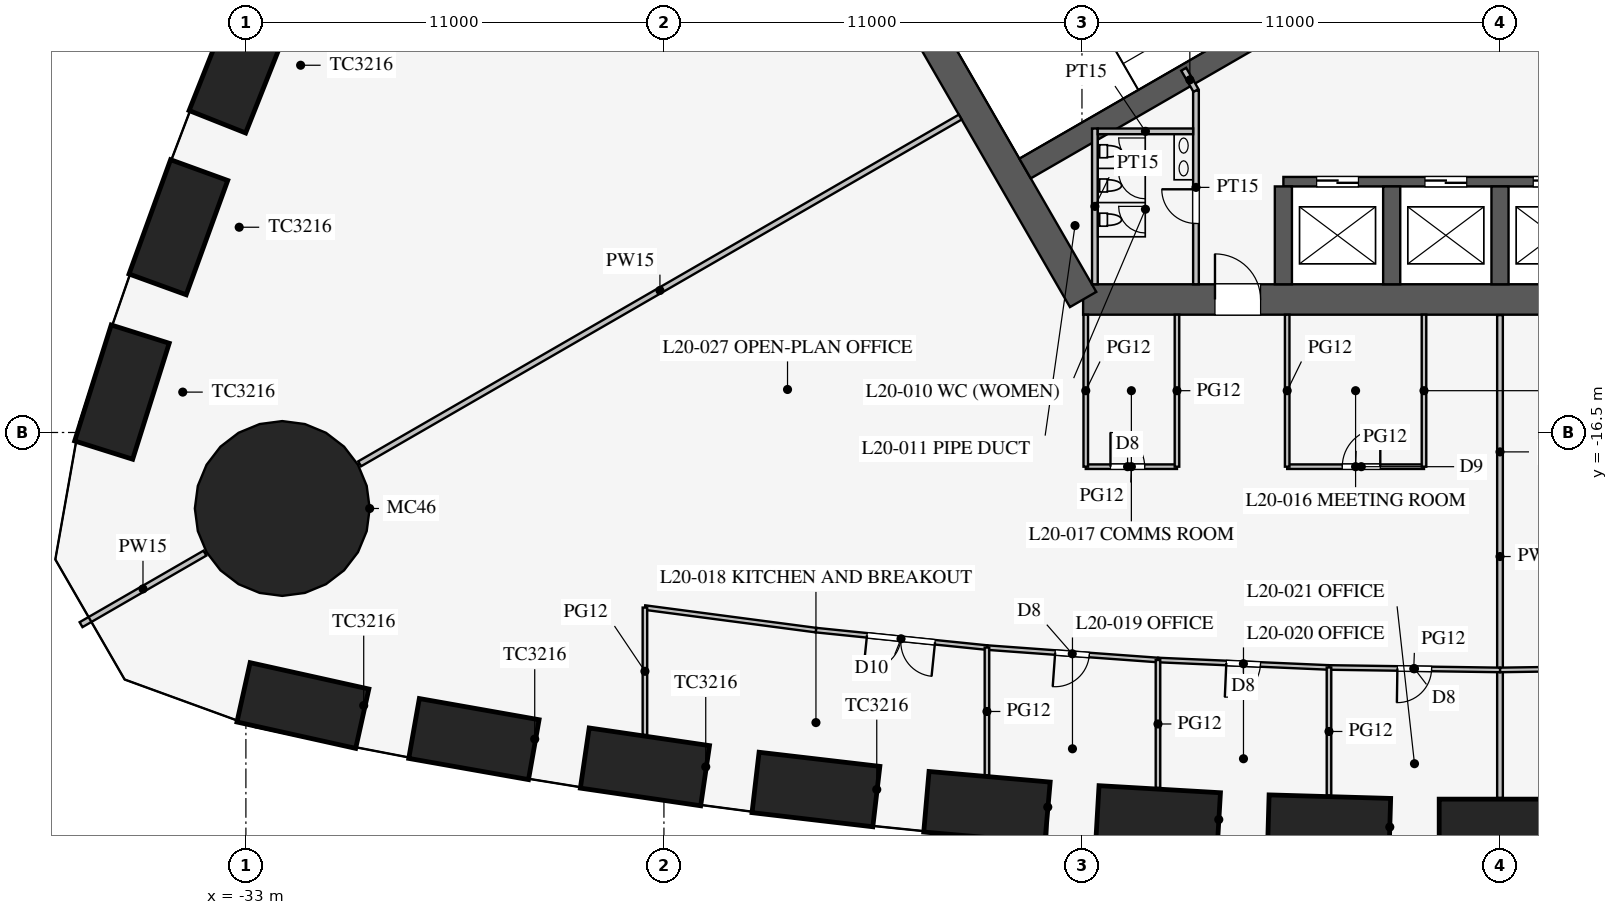
"""IFC4 building model, lengths in metres.
Left out: names, types, materials, properties, quantities, classifications, styles, units other than length and angle.
Written with IfcOpenShell. Run it as: python <this file> out.ifc"""

import sys

from ifc_helpers import new_model, si_unit, direction, frame, frame_2d, origin, origin_2d, place, context, subcontext, project, spatial, rectangle, circle, extrude, element, fill, save


model = new_model("IFC4")
c1 = context("Model", 3, precision=1e-05, world=origin(), true_north=direction((0.0, 1.0)))
c2 = subcontext(c1, "Body", "Model", "MODEL_VIEW")
j1 = project(units=[si_unit("LENGTHUNIT", "METRE"), si_unit("PLANEANGLEUNIT", "RADIAN")], contexts=[c1])
p1 = place(None, origin())
s1 = spatial("IfcSite", under=j1, at=p1, CompositionType="ELEMENT")
p2 = place(p1, origin())
s2 = spatial("IfcBuilding", under=s1, at=p2, CompositionType="ELEMENT")
p3 = place(p2, frame((0.0, 0.0, 87.9)))
s3 = spatial("IfcBuildingStorey", under=s2, at=p3, CompositionType="ELEMENT", Elevation=87.9)
for number, where, z_axis, x_axis in (
    (1, (-31.5, -23.685, 0.0), (0.0, 0.0, 1.0), (0.976, -0.217, 0.0)),
    (2, (-27.0, -24.568, 0.0), (0.0, 0.0, 1.0), (0.985, -0.174, 0.0)),
    (3, (-22.5, -25.299, 0.0), (0.0, 0.0, 1.0), (0.989, -0.145, 0.0)),
    (4, (-18.0, -25.895, 0.0), (0.0, 0.0, 1.0), (0.993, -0.116, 0.0)),
    (5, (-13.5, -26.357, 0.0), (0.0, 0.0, 1.0), (0.996, -0.087, 0.0)),
    (6, (-9.0, -26.686, 0.0), (0.0, 0.0, 1.0), (0.998, -0.058, 0.0)),
    (7, (-4.5, -26.883, 0.0), (0.0, 0.0, 1.0), (1.0, -0.029, 0.0)),
    (8, (0.0, -26.949, 0.0), (0.0, 0.0, 1.0), (1.0, 0.0, 0.0)),
    (9, (-33.16, -6.836, 0.0), (0.0, 0.0, 1.0), (-0.369, -0.929, 0.0)),
    (10, (-34.776, -11.099, 0.0), (0.0, 0.0, 1.0), (-0.342, -0.94, 0.0)),
    (11, (-36.262, -15.438, 0.0), (0.0, 0.0, 1.0), (-0.3, -0.954, 0.0)),
):
    element("IfcColumn", number, at=place(p3, frame(where, z_axis=z_axis, x_axis=x_axis)), inside=s3, PredefinedType="COLUMN", context=c2, shape_type="SweptSolid", body=[
        extrude(rectangle(XDim=3.2, YDim=1.6, at=origin_2d()), origin(), (0.0, 0.0, 1.0), 4.2),
    ])
p4 = place(p3, frame((-32.043, -18.5, 0.0), z_axis=(0.0, 0.0, 1.0), x_axis=(1.0, 0.0, 0.0)))
e12 = element("IfcColumn", 12, at=p4, inside=s3, PredefinedType="COLUMN", context=c2, shape_type="SweptSolid", body=[
    extrude(circle(Radius=2.3, at=origin_2d()), origin(), (0.0, 0.0, 1.0), 4.2),
])
p5 = place(p3, frame((-10.97, -13.0, 0.0), z_axis=(0.0, 0.0, 1.0), x_axis=(1.0, 0.0, 0.0)))
e13 = element("IfcWall", 13, at=p5, inside=s3, PredefinedType="SHEAR", context=c2, shape_type="SweptSolid", body=[
    extrude(rectangle(XDim=21.939, YDim=0.8, at=frame_2d((10.97, 0.0))), origin(), (0.0, 0.0, 1.0), 4.2),
])
p6 = place(p5, frame((17.27, 0.0, 0.0)))
e14 = element("IfcOpeningElement", 14, at=p6, cuts=e13, PredefinedType="OPENING", context=c2, shape_type="SweptSolid", body=[
    extrude(rectangle(XDim=1.2, YDim=2.1, at=frame_2d((0.6, 1.05))), frame((0.0, 0.41, 0.0), z_axis=(0.0, -1.0, 0.0), x_axis=(1.0, 0.0, 0.0)), (0.0, 0.0, 1.0), 0.82),
])
p7 = place(p5, frame((3.47, 0.0, 0.0)))
e15 = element("IfcOpeningElement", 15, at=p7, cuts=e13, PredefinedType="OPENING", context=c2, shape_type="SweptSolid", body=[
    extrude(rectangle(XDim=1.2, YDim=2.1, at=frame_2d((0.6, 1.05))), frame((0.0, 0.41, 0.0), z_axis=(0.0, -1.0, 0.0), x_axis=(1.0, 0.0, 0.0)), (0.0, 0.0, 1.0), 0.82),
])
p8 = place(p3, frame((-16.743, -3.0, 0.0), z_axis=(0.0, 0.0, 1.0), x_axis=(0.499995765644, -0.866027848477, 0.0)))
e16 = element("IfcWall", 16, at=p8, inside=s3, PredefinedType="SHEAR", context=c2, shape_type="SweptSolid", body=[
    extrude(rectangle(XDim=11.547, YDim=0.8, at=frame_2d((5.773, 0.0))), origin(), (0.0, 0.0, 1.0), 4.2),
])
p9 = place(p3, frame((-5.7, -9.9, 0.0), z_axis=(0.0, 0.0, 1.0), x_axis=(1.0, 0.0, 0.0)))
e17 = element("IfcWall", 17, at=p9, inside=s3, PredefinedType="SHEAR", context=c2, shape_type="SweptSolid", body=[
    extrude(rectangle(XDim=11.4, YDim=0.25, at=frame_2d((5.7, 0.0))), origin(), (0.0, 0.0, 1.0), 4.2),
])
p10 = place(p9, frame((0.875, 0.0, 0.0)))
e18 = element("IfcOpeningElement", 18, at=p10, cuts=e17, PredefinedType="OPENING", context=c2, shape_type="SweptSolid", body=[
    extrude(rectangle(XDim=1.1, YDim=2.2, at=frame_2d((0.55, 1.1))), frame((0.0, 0.135, 0.0), z_axis=(0.0, -1.0, 0.0), x_axis=(1.0, 0.0, 0.0)), (0.0, 0.0, 1.0), 0.27),
])
p11 = place(p9, frame((3.725, 0.0, 0.0)))
e19 = element("IfcOpeningElement", 19, at=p11, cuts=e17, PredefinedType="OPENING", context=c2, shape_type="SweptSolid", body=[
    extrude(rectangle(XDim=1.1, YDim=2.2, at=frame_2d((0.55, 1.1))), frame((0.0, 0.135, 0.0), z_axis=(0.0, -1.0, 0.0), x_axis=(1.0, 0.0, 0.0)), (0.0, 0.0, 1.0), 0.27),
])
p12 = place(p9, frame((6.575, 0.0, 0.0)))
e20 = element("IfcOpeningElement", 20, at=p12, cuts=e17, PredefinedType="OPENING", context=c2, shape_type="SweptSolid", body=[
    extrude(rectangle(XDim=1.1, YDim=2.2, at=frame_2d((0.55, 1.1))), frame((0.0, 0.135, 0.0), z_axis=(0.0, -1.0, 0.0), x_axis=(1.0, 0.0, 0.0)), (0.0, 0.0, 1.0), 0.27),
])
p13 = place(p9, frame((9.425, 0.0, 0.0)))
e21 = element("IfcOpeningElement", 21, at=p13, cuts=e17, PredefinedType="OPENING", context=c2, shape_type="SweptSolid", body=[
    extrude(rectangle(XDim=1.1, YDim=2.2, at=frame_2d((0.55, 1.1))), frame((0.0, 0.135, 0.0), z_axis=(0.0, -1.0, 0.0), x_axis=(1.0, 0.0, 0.0)), (0.0, 0.0, 1.0), 0.27),
])
for number, where, z_axis, x_axis in (
    (22, (-5.7, -10.025, 0.0), (0.0, 0.0, 1.0), (0.0, -1.0, 0.0)),
    (23, (-2.85, -10.025, 0.0), (0.0, 0.0, 1.0), (0.0, -1.0, 0.0)),
    (24, (0.0, -10.025, 0.0), (0.0, 0.0, 1.0), (0.0, -1.0, 0.0)),
):
    element("IfcWall", number, at=place(p3, frame(where, z_axis=z_axis, x_axis=x_axis)), inside=s3, PredefinedType="SHEAR", context=c2, shape_type="SweptSolid", body=[
        extrude(rectangle(XDim=2.575, YDim=0.45, at=frame_2d((1.288, 0.0))), origin(), (0.0, 0.0, 1.0), 4.2),
    ])
p14 = place(p3, frame((-4.638, -5.016, 0.0), z_axis=(0.0, 0.0, 1.0), x_axis=(-0.866019375473, -0.500010441196, 0.0)))
e25 = element("IfcWall", 25, at=p14, inside=s3, PredefinedType="SHEAR", context=c2, shape_type="SweptSolid", body=[
    extrude(rectangle(XDim=9.075, YDim=0.6, at=frame_2d((4.538, 0.0))), origin(), (0.0, 0.0, 1.0), 4.2),
])
p15 = place(p3, frame((-8.0, -7.5, 0.0), z_axis=(0.0, 0.0, 1.0), x_axis=(0.0, -1.0, 0.0)))
e26 = element("IfcWall", 26, at=p15, inside=s3, PredefinedType="PARTITIONING", context=c2, shape_type="SweptSolid", body=[
    extrude(rectangle(XDim=5.1, YDim=0.15, at=frame_2d((2.55, 0.0))), origin(), (0.0, 0.0, 1.0), 3.95),
])
p16 = place(p15, frame((2.6, 0.0, 0.0)))
e27 = element("IfcOpeningElement", 27, at=p16, cuts=e26, PredefinedType="OPENING", context=c2, shape_type="SweptSolid", body=[
    extrude(rectangle(XDim=0.9, YDim=2.1, at=frame_2d((0.45, 1.05))), frame((0.0, 0.085, 0.0), z_axis=(0.0, -1.0, 0.0), x_axis=(1.0, 0.0, 0.0)), (0.0, 0.0, 1.0), 0.17),
])
p17 = place(p3, frame((-8.0, -7.5, 0.0), z_axis=(0.0, 0.0, 1.0), x_axis=(-0.499842556608, 0.866116284689, 0.0)))
e28 = element("IfcWall", 28, at=p17, inside=s3, PredefinedType="PARTITIONING", context=c2, shape_type="SweptSolid", body=[
    extrude(rectangle(XDim=0.645, YDim=0.15, at=frame_2d((0.323, 0.0))), origin(), (0.0, 0.0, 1.0), 3.95),
])
p18 = place(p3, frame((-10.66, -8.5, 0.0), z_axis=(0.0, 0.0, 1.0), x_axis=(0.0, -1.0, 0.0)))
e29 = element("IfcWall", 29, at=p18, inside=s3, PredefinedType="PARTITIONING", context=c2, shape_type="SweptSolid", body=[
    extrude(rectangle(XDim=4.1, YDim=0.15, at=frame_2d((2.05, 0.0))), origin(), (0.0, 0.0, 1.0), 3.95),
])
p19 = place(p3, frame((-8.075, -8.575, 0.0), z_axis=(0.0, 0.0, 1.0), x_axis=(-1.0, 0.0, 0.0)))
e30 = element("IfcWall", 30, at=p19, inside=s3, PredefinedType="PARTITIONING", context=c2, shape_type="SweptSolid", body=[
    extrude(rectangle(XDim=2.51, YDim=0.15, at=frame_2d((1.255, 0.0))), origin(), (0.0, 0.0, 1.0), 3.95),
])
p20 = place(p3, frame((-14.203, -8.2, 0.0), z_axis=(0.0, 0.0, 1.0), x_axis=(-0.866024965723, -0.500000758745, 0.0)))
e31 = element("IfcWall", 31, at=p20, inside=s3, PredefinedType="PARTITIONING", context=c2, shape_type="SweptSolid", body=[
    extrude(rectangle(XDim=18.25, YDim=0.15, at=frame_2d((9.125, 0.0))), origin(), (0.0, 0.0, 1.0), 1.95),
])
p21 = place(p3, frame((-34.078, -19.675, 0.0), z_axis=(0.0, 0.0, 1.0), x_axis=(-0.866019247219, -0.500010663332, 0.0)))
e32 = element("IfcWall", 32, at=p21, inside=s3, PredefinedType="PARTITIONING", context=c2, shape_type="SweptSolid", body=[
    extrude(rectangle(XDim=3.764, YDim=0.15, at=frame_2d((1.882, 0.0))), origin(), (0.0, 0.0, 1.0), 1.95),
])
p22 = place(p3, frame((0.0, -13.41, 0.0), z_axis=(0.0, 0.0, 1.0), x_axis=(0.0, -1.0, 0.0)))
e33 = element("IfcWall", 33, at=p22, inside=s3, PredefinedType="PARTITIONING", context=c2, shape_type="SweptSolid", body=[
    extrude(rectangle(XDim=12.709, YDim=0.15, at=frame_2d((6.354, 0.0))), origin(), (0.0, 0.0, 1.0), 2.15),
])
p23 = place(p3, frame((-10.9, -17.4, 0.0), z_axis=(0.0, 0.0, 1.0), x_axis=(1.0, 0.0, 0.0)))
e34 = element("IfcWall", 34, at=p23, inside=s3, PredefinedType="PARTITIONING", context=c2, shape_type="SweptSolid", body=[
    extrude(rectangle(XDim=2.4, YDim=0.12, at=frame_2d((1.2, 0.0))), origin(), (0.0, 0.0, 1.0), 2.9),
])
p24 = place(p23, frame((0.65, 0.0, 0.15)))
e35 = element("IfcOpeningElement", 35, at=p24, cuts=e34, PredefinedType="OPENING", context=c2, shape_type="SweptSolid", body=[
    extrude(rectangle(XDim=0.9, YDim=2.1, at=frame_2d((0.45, 1.05))), frame((0.0, 0.07, 0.0), z_axis=(0.0, -1.0, 0.0), x_axis=(1.0, 0.0, 0.0)), (0.0, 0.0, 1.0), 0.14),
])
p25 = place(p3, frame((-5.6, -17.4, 0.0), z_axis=(0.0, 0.0, 1.0), x_axis=(1.0, 0.0, 0.0)))
e36 = element("IfcWall", 36, at=p25, inside=s3, PredefinedType="PARTITIONING", context=c2, shape_type="SweptSolid", body=[
    extrude(rectangle(XDim=3.6, YDim=0.12, at=frame_2d((1.8, 0.0))), origin(), (0.0, 0.0, 1.0), 2.9),
])
p26 = place(p25, frame((1.45, 0.0, 0.15)))
e37 = element("IfcOpeningElement", 37, at=p26, cuts=e36, PredefinedType="OPENING", context=c2, shape_type="SweptSolid", body=[
    extrude(rectangle(XDim=1.0, YDim=2.1, at=frame_2d((0.5, 1.05))), frame((0.0, 0.07, 0.0), z_axis=(0.0, -1.0, 0.0), x_axis=(1.0, 0.0, 0.0)), (0.0, 0.0, 1.0), 0.14),
])
for number, where, z_axis, x_axis in (
    (38, (-10.9, -13.4, 0.0), (0.0, 0.0, 1.0), (0.0, -1.0, 0.0)),
    (39, (-2.0, -13.4, 0.0), (0.0, 0.0, 1.0), (0.0, -1.0, 0.0)),
    (40, (-5.6, -13.4, 0.0), (0.0, 0.0, 1.0), (0.0, -1.0, 0.0)),
    (41, (-8.5, -13.4, 0.0), (0.0, 0.0, 1.0), (0.0, -1.0, 0.0)),
):
    element("IfcWall", number, at=place(p3, frame(where, z_axis=z_axis, x_axis=x_axis)), inside=s3, PredefinedType="PARTITIONING", context=c2, shape_type="SweptSolid", body=[
        extrude(rectangle(XDim=4.0, YDim=0.12, at=frame_2d((2.0, 0.0))), origin(), (0.0, 0.0, 1.0), 2.9),
    ])
p27 = place(p3, frame((0.0, -22.749, 0.0), z_axis=(0.0, 0.0, 1.0), x_axis=(0.999894311967, 0.014538393859, 0.0)))
e42 = element("IfcWall", 42, at=p27, inside=s3, PredefinedType="PARTITIONING", context=c2, shape_type="SweptSolid", body=[
    extrude(rectangle(XDim=4.5, YDim=0.12, at=frame_2d((2.25, 0.0))), origin(), (0.0, 0.0, 1.0), 2.9),
])
p28 = place(p27, frame((1.8, 0.0, 0.15)))
e43 = element("IfcOpeningElement", 43, at=p28, cuts=e42, PredefinedType="OPENING", context=c2, shape_type="SweptSolid", body=[
    extrude(rectangle(XDim=0.9, YDim=2.1, at=frame_2d((0.45, 1.05))), frame((0.0, 0.07, 0.0), z_axis=(0.0, -1.0, 0.0), x_axis=(1.0, 0.0, 0.0)), (0.0, 0.0, 1.0), 0.14),
])
p29 = place(p3, frame((-13.5, -22.16, 0.0), z_axis=(0.0, 0.0, 1.0), x_axis=(0.997363894896, -0.072562119306, 0.0)))
e44 = element("IfcWall", 44, at=p29, inside=s3, PredefinedType="PARTITIONING", context=c2, shape_type="SweptSolid", body=[
    extrude(rectangle(XDim=4.512, YDim=0.12, at=frame_2d((2.256, 0.0))), origin(), (0.0, 0.0, 1.0), 2.9),
])
p30 = place(p29, frame((1.8, 0.0, 0.15)))
e45 = element("IfcOpeningElement", 45, at=p30, cuts=e44, PredefinedType="OPENING", context=c2, shape_type="SweptSolid", body=[
    extrude(rectangle(XDim=0.9, YDim=2.1, at=frame_2d((0.45, 1.05))), frame((0.0, 0.07, 0.0), z_axis=(0.0, -1.0, 0.0), x_axis=(1.0, 0.0, 0.0)), (0.0, 0.0, 1.0), 0.14),
])
p31 = place(p3, frame((-18.0, -21.701, 0.0), z_axis=(0.0, 0.0, 1.0), x_axis=(0.994833141332, -0.101523499286, 0.0)))
e46 = element("IfcWall", 46, at=p31, inside=s3, PredefinedType="PARTITIONING", context=c2, shape_type="SweptSolid", body=[
    extrude(rectangle(XDim=4.523, YDim=0.12, at=frame_2d((2.262, 0.0))), origin(), (0.0, 0.0, 1.0), 2.9),
])
p32 = place(p31, frame((1.35, 0.0, 0.15)))
e47 = element("IfcOpeningElement", 47, at=p32, cuts=e46, PredefinedType="OPENING", context=c2, shape_type="SweptSolid", body=[
    extrude(rectangle(XDim=1.8, YDim=2.1, at=frame_2d((0.9, 1.05))), frame((0.0, 0.07, 0.0), z_axis=(0.0, -1.0, 0.0), x_axis=(1.0, 0.0, 0.0)), (0.0, 0.0, 1.0), 0.14),
])
p33 = place(p3, frame((-22.5, -21.108, 0.0), z_axis=(0.0, 0.0, 1.0), x_axis=(0.991435244698, -0.130599217346, 0.0)))
e48 = element("IfcWall", 48, at=p33, inside=s3, PredefinedType="PARTITIONING", context=c2, shape_type="SweptSolid", body=[
    extrude(rectangle(XDim=4.539, YDim=0.12, at=frame_2d((2.27, 0.0))), origin(), (0.0, 0.0, 1.0), 2.9),
])
p34 = place(p3, frame((-4.5, -22.683, 0.0), z_axis=(0.0, 0.0, 1.0), x_axis=(0.999894311967, -0.014538393859, 0.0)))
e49 = element("IfcWall", 49, at=p34, inside=s3, PredefinedType="PARTITIONING", context=c2, shape_type="SweptSolid", body=[
    extrude(rectangle(XDim=4.5, YDim=0.12, at=frame_2d((2.25, 0.0))), origin(), (0.0, 0.0, 1.0), 2.9),
])
p35 = place(p34, frame((1.8, 0.0, 0.15)))
e50 = element("IfcOpeningElement", 50, at=p35, cuts=e49, PredefinedType="OPENING", context=c2, shape_type="SweptSolid", body=[
    extrude(rectangle(XDim=0.9, YDim=2.1, at=frame_2d((0.45, 1.05))), frame((0.0, 0.07, 0.0), z_axis=(0.0, -1.0, 0.0), x_axis=(1.0, 0.0, 0.0)), (0.0, 0.0, 1.0), 0.14),
])
p36 = place(p3, frame((-9.0, -22.487, 0.0), z_axis=(0.0, 0.0, 1.0), x_axis=(0.999052370647, -0.043524254212, 0.0)))
e51 = element("IfcWall", 51, at=p36, inside=s3, PredefinedType="PARTITIONING", context=c2, shape_type="SweptSolid", body=[
    extrude(rectangle(XDim=4.504, YDim=0.12, at=frame_2d((2.252, 0.0))), origin(), (0.0, 0.0, 1.0), 2.9),
])
p37 = place(p36, frame((1.8, 0.0, 0.15)))
e52 = element("IfcOpeningElement", 52, at=p37, cuts=e51, PredefinedType="OPENING", context=c2, shape_type="SweptSolid", body=[
    extrude(rectangle(XDim=0.9, YDim=2.1, at=frame_2d((0.45, 1.05))), frame((0.0, 0.07, 0.0), z_axis=(0.0, -1.0, 0.0), x_axis=(1.0, 0.0, 0.0)), (0.0, 0.0, 1.0), 0.14),
])
p38 = place(p3, frame((-13.5, -22.16, 0.0), z_axis=(0.0, 0.0, 1.0), x_axis=(0.0, -1.0, 0.0)))
e53 = element("IfcWall", 53, at=p38, inside=s3, PredefinedType="PARTITIONING", context=c2, shape_type="SweptSolid", body=[
    extrude(rectangle(XDim=3.364, YDim=0.12, at=frame_2d((1.682, 0.0))), origin(), (0.0, 0.0, 1.0), 2.15),
])
p39 = place(p3, frame((-22.5, -21.108, 0.0), z_axis=(0.0, 0.0, 1.0), x_axis=(0.0, -1.0, 0.0)))
e54 = element("IfcWall", 54, at=p39, inside=s3, PredefinedType="PARTITIONING", context=c2, shape_type="SweptSolid", body=[
    extrude(rectangle(XDim=3.353, YDim=0.12, at=frame_2d((1.676, 0.0))), origin(), (0.0, 0.0, 1.0), 2.35),
])
p40 = place(p3, frame((-4.5, -22.683, 0.0), z_axis=(0.0, 0.0, 1.0), x_axis=(0.0, -1.0, 0.0)))
e55 = element("IfcWall", 55, at=p40, inside=s3, PredefinedType="PARTITIONING", context=c2, shape_type="SweptSolid", body=[
    extrude(rectangle(XDim=3.369, YDim=0.12, at=frame_2d((1.685, 0.0))), origin(), (0.0, 0.0, 1.0), 2.15),
])
p41 = place(p3, frame((-9.0, -22.487, 0.0), z_axis=(0.0, 0.0, 1.0), x_axis=(0.0, -1.0, 0.0)))
e56 = element("IfcWall", 56, at=p41, inside=s3, PredefinedType="PARTITIONING", context=c2, shape_type="SweptSolid", body=[
    extrude(rectangle(XDim=3.367, YDim=0.12, at=frame_2d((1.684, 0.0))), origin(), (0.0, 0.0, 1.0), 2.15),
])
p42 = place(p16, frame((0.9, 0.0, 0.0), z_axis=(0.0, 0.0, 1.0), x_axis=(-1.0, 0.0, 0.0)))
e57 = element("IfcDoor", 57, at=p42, inside=s3, OperationType="SINGLE_SWING_RIGHT", PredefinedType="DOOR", context=c2, shape_type="SweptSolid", body=[
    extrude(rectangle(XDim=0.9, YDim=2.1, at=frame_2d((0.45, 1.05))), frame((0.0, 0.025, 0.0), z_axis=(0.0, -1.0, 0.0), x_axis=(1.0, 0.0, 0.0)), (0.0, 0.0, 1.0), 0.05),
])
fill(e27, e57)
p43 = place(p7, origin())
e58 = element("IfcDoor", 58, at=p43, inside=s3, OperationType="SINGLE_SWING_LEFT", PredefinedType="DOOR", context=c2, shape_type="SweptSolid", body=[
    extrude(rectangle(XDim=1.2, YDim=2.1, at=frame_2d((0.6, 1.05))), frame((0.0, 0.025, 0.0), z_axis=(0.0, -1.0, 0.0), x_axis=(1.0, 0.0, 0.0)), (0.0, 0.0, 1.0), 0.05),
])
fill(e15, e58)
p44 = place(p26, origin())
e59 = element("IfcDoor", 59, at=p44, inside=s3, OperationType="SINGLE_SWING_RIGHT", PredefinedType="DOOR", context=c2, shape_type="SweptSolid", body=[
    extrude(rectangle(XDim=1.0, YDim=2.1, at=frame_2d((0.5, 1.05))), frame((0.0, 0.025, 0.0), z_axis=(0.0, -1.0, 0.0), x_axis=(1.0, 0.0, 0.0)), (0.0, 0.0, 1.0), 0.05),
])
fill(e37, e59)
p45 = place(p24, origin())
e60 = element("IfcDoor", 60, at=p45, inside=s3, OperationType="SINGLE_SWING_LEFT", PredefinedType="DOOR", context=c2, shape_type="SweptSolid", body=[
    extrude(rectangle(XDim=0.9, YDim=2.1, at=frame_2d((0.45, 1.05))), frame((0.0, 0.025, 0.0), z_axis=(0.0, -1.0, 0.0), x_axis=(1.0, 0.0, 0.0)), (0.0, 0.0, 1.0), 0.05),
])
fill(e35, e60)
p46 = place(p32, frame((1.8, 0.0, 0.0), z_axis=(0.0, 0.0, 1.0), x_axis=(-1.0, 0.0, 0.0)))
e61 = element("IfcDoor", 61, at=p46, inside=s3, OperationType="DOUBLE_DOOR_SINGLE_SWING", PredefinedType="DOOR", context=c2, shape_type="SweptSolid", body=[
    extrude(rectangle(XDim=1.8, YDim=2.1, at=frame_2d((0.9, 1.05))), frame((0.0, 0.025, 0.0), z_axis=(0.0, -1.0, 0.0), x_axis=(1.0, 0.0, 0.0)), (0.0, 0.0, 1.0), 0.05),
])
fill(e47, e61)
p47 = place(p30, frame((0.9, 0.0, 0.0), z_axis=(0.0, 0.0, 1.0), x_axis=(-1.0, 0.0, 0.0)))
e62 = element("IfcDoor", 62, at=p47, inside=s3, OperationType="SINGLE_SWING_RIGHT", PredefinedType="DOOR", context=c2, shape_type="SweptSolid", body=[
    extrude(rectangle(XDim=0.9, YDim=2.1, at=frame_2d((0.45, 1.05))), frame((0.0, 0.025, 0.0), z_axis=(0.0, -1.0, 0.0), x_axis=(1.0, 0.0, 0.0)), (0.0, 0.0, 1.0), 0.05),
])
fill(e45, e62)
p48 = place(p37, frame((0.9, 0.0, 0.0), z_axis=(0.0, 0.0, 1.0), x_axis=(-1.0, 0.0, 0.0)))
e63 = element("IfcDoor", 63, at=p48, inside=s3, OperationType="SINGLE_SWING_RIGHT", PredefinedType="DOOR", context=c2, shape_type="SweptSolid", body=[
    extrude(rectangle(XDim=0.9, YDim=2.1, at=frame_2d((0.45, 1.05))), frame((0.0, 0.025, 0.0), z_axis=(0.0, -1.0, 0.0), x_axis=(1.0, 0.0, 0.0)), (0.0, 0.0, 1.0), 0.05),
])
fill(e52, e63)
p49 = place(p35, frame((0.9, 0.0, 0.0), z_axis=(0.0, 0.0, 1.0), x_axis=(-1.0, 0.0, 0.0)))
e64 = element("IfcDoor", 64, at=p49, inside=s3, OperationType="SINGLE_SWING_RIGHT", PredefinedType="DOOR", context=c2, shape_type="SweptSolid", body=[
    extrude(rectangle(XDim=0.9, YDim=2.1, at=frame_2d((0.45, 1.05))), frame((0.0, 0.025, 0.0), z_axis=(0.0, -1.0, 0.0), x_axis=(1.0, 0.0, 0.0)), (0.0, 0.0, 1.0), 0.05),
])
fill(e50, e64)
p50 = place(p10, origin())
e65 = element("IfcDoor", 65, at=p50, inside=s3, OperationType="DOUBLE_DOOR_SLIDING", PredefinedType="DOOR", context=c2, shape_type="SweptSolid", body=[
    extrude(rectangle(XDim=1.1, YDim=2.2, at=frame_2d((0.55, 1.1))), frame((0.0, 0.025, 0.0), z_axis=(0.0, -1.0, 0.0), x_axis=(1.0, 0.0, 0.0)), (0.0, 0.0, 1.0), 0.05),
])
fill(e18, e65)
p51 = place(p11, origin())
e66 = element("IfcDoor", 66, at=p51, inside=s3, OperationType="DOUBLE_DOOR_SLIDING", PredefinedType="DOOR", context=c2, shape_type="SweptSolid", body=[
    extrude(rectangle(XDim=1.1, YDim=2.2, at=frame_2d((0.55, 1.1))), frame((0.0, 0.025, 0.0), z_axis=(0.0, -1.0, 0.0), x_axis=(1.0, 0.0, 0.0)), (0.0, 0.0, 1.0), 0.05),
])
fill(e19, e66)
p52 = place(p12, origin())
e67 = element("IfcDoor", 67, at=p52, inside=s3, OperationType="DOUBLE_DOOR_SLIDING", PredefinedType="DOOR", context=c2, shape_type="SweptSolid", body=[
    extrude(rectangle(XDim=1.1, YDim=2.2, at=frame_2d((0.55, 1.1))), frame((0.0, 0.025, 0.0), z_axis=(0.0, -1.0, 0.0), x_axis=(1.0, 0.0, 0.0)), (0.0, 0.0, 1.0), 0.05),
])
fill(e20, e67)
save(model, sys.argv[1])
